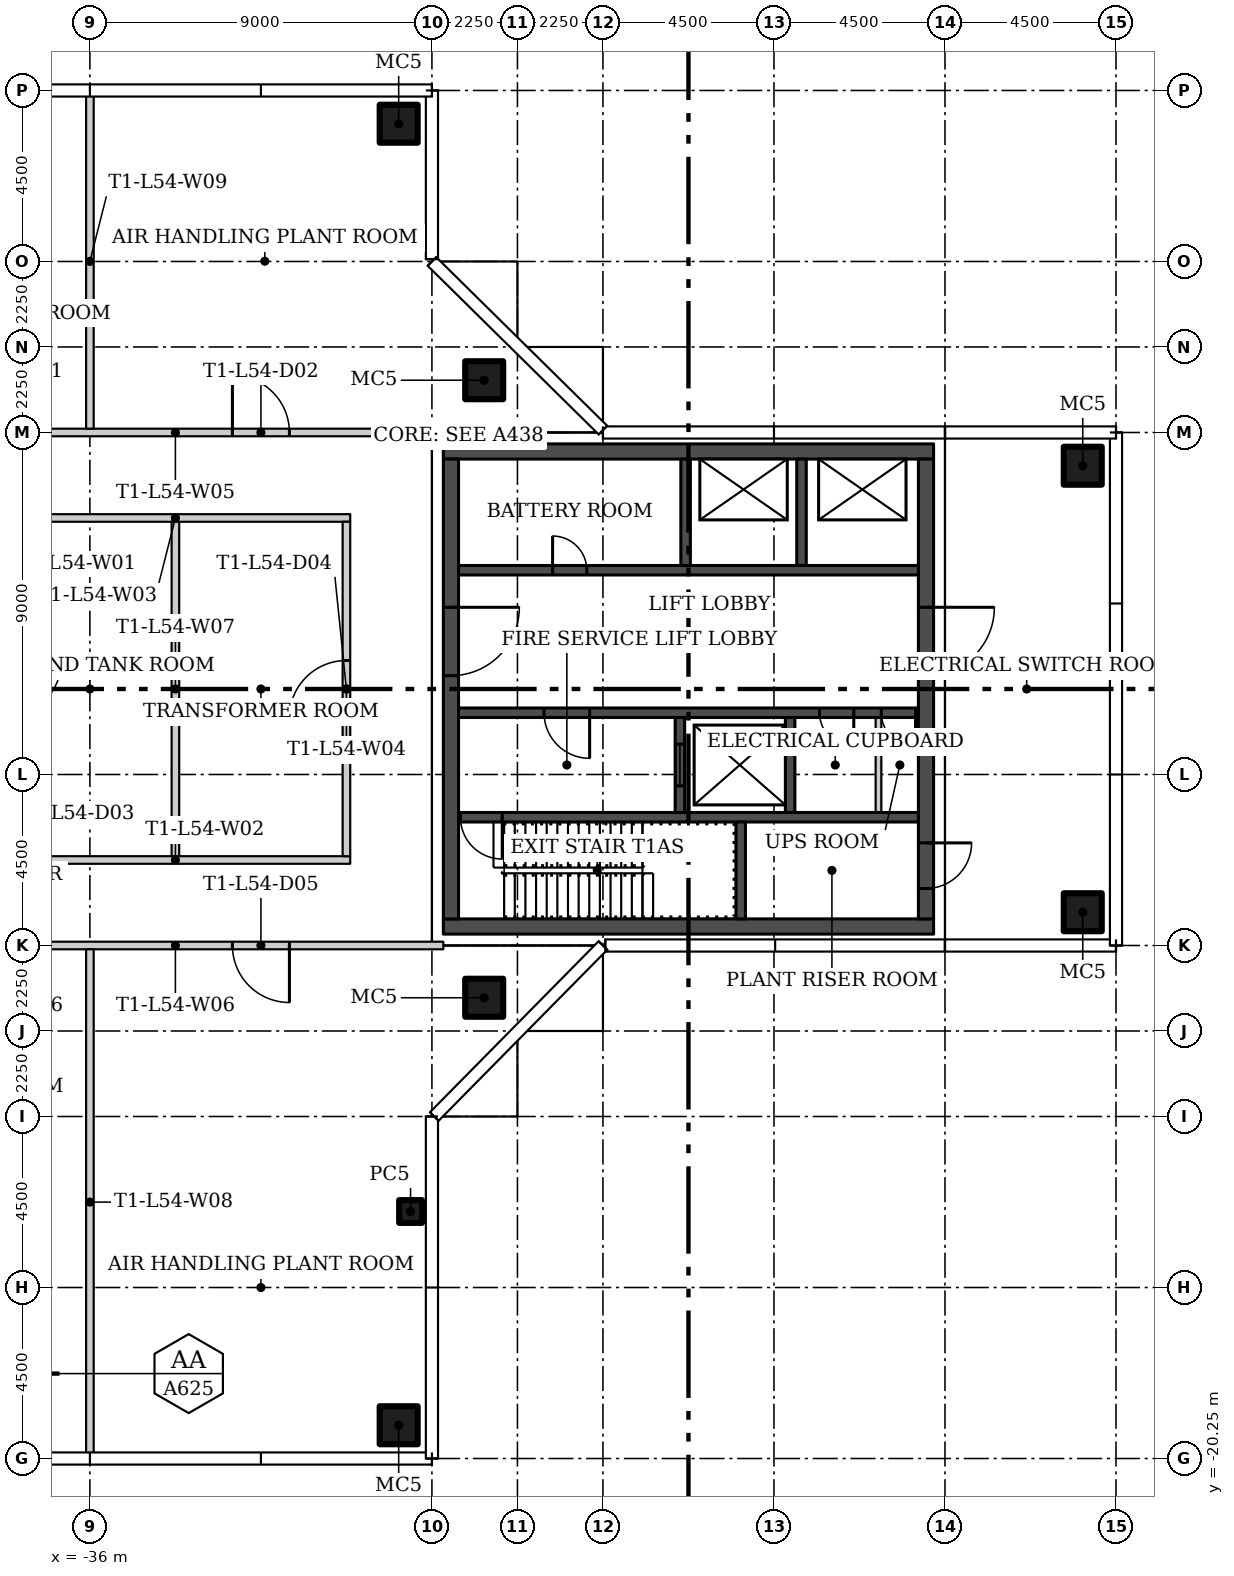
"""IFC4 building model, lengths in metres.
Left out: names, types, materials, properties, quantities, classifications, styles, units other than length and angle.
Written with IfcOpenShell. Run it as: python <this file> out.ifc"""

import sys

from ifc_helpers import new_model, si_unit, direction, frame, frame_2d, origin, origin_2d, place, context, subcontext, project, spatial, rectangle, hollow_rectangle, extrude, element, fill, save


model = new_model("IFC4")
c1 = context("Model", 3, precision=1e-05, world=origin(), true_north=direction((0.0, 1.0)))
c2 = subcontext(c1, "Body", "Model", "MODEL_VIEW")
j1 = project(units=[si_unit("LENGTHUNIT", "METRE"), si_unit("PLANEANGLEUNIT", "RADIAN")], contexts=[c1])
p1 = place(None, origin())
s1 = spatial("IfcSite", under=j1, at=p1, CompositionType="ELEMENT")
p2 = place(p1, origin())
s2 = spatial("IfcBuilding", under=s1, at=p2, CompositionType="ELEMENT")
p3 = place(p2, frame((0.0, 0.0, 225.6)))
s3 = spatial("IfcBuildingStorey", under=s2, at=p3, CompositionType="ELEMENT", Elevation=225.6)
for number, where in (
    (1, (-25.625, 8.125, 0.0)),
    (2, (-25.625, -8.125, 0.0)),
    (3, (-9.875, -5.875, 0.0)),
    (4, (-9.875, 5.875, 0.0)),
    (5, (-27.875, 14.875, 0.0)),
):
    element("IfcColumn", number, at=place(p3, frame(where)), inside=s3, PredefinedType="COLUMN", context=c2, shape_type="SweptSolid", body=[
        extrude(hollow_rectangle(XDim=1.0, YDim=1.0, WallThickness=0.04, at=origin_2d()), origin(), (0.0, 0.0, 1.0), 4.45),
    ])
p4 = place(p3, frame((-27.562, -13.75, 0.0)))
e6 = element("IfcColumn", 6, at=p4, inside=s3, PredefinedType="COLUMN", context=c2, shape_type="SweptSolid", body=[
    extrude(hollow_rectangle(XDim=0.6, YDim=0.6, WallThickness=0.02, at=origin_2d()), origin(), (0.0, 0.0, 1.0), 4.45),
])
p5 = place(p3, frame((-27.875, -19.375, 0.0)))
e7 = element("IfcColumn", 7, at=p5, inside=s3, PredefinedType="COLUMN", context=c2, shape_type="SweptSolid", body=[
    extrude(hollow_rectangle(XDim=1.0, YDim=1.0, WallThickness=0.04, at=origin_2d()), origin(), (0.0, 0.0, 1.0), 4.45),
])
p6 = place(p3, frame((-38.35, -4.5, 0.0)))
e8 = element("IfcWall", 8, at=p6, inside=s3, PredefinedType="PARTITIONING", context=c2, shape_type="SweptSolid", body=[
    extrude(rectangle(XDim=9.2, YDim=0.2, at=frame_2d((4.6, 0.0))), origin(), (0.0, 0.0, 1.0), 4.45),
])
p7 = place(p3, frame((-29.15, 4.5, 0.0), z_axis=(0.0, 0.0, 1.0), x_axis=(-1.0, 0.0, 0.0)))
e9 = element("IfcWall", 9, at=p7, inside=s3, PredefinedType="PARTITIONING", context=c2, shape_type="SweptSolid", body=[
    extrude(rectangle(XDim=9.2, YDim=0.2, at=frame_2d((4.6, 0.0))), origin(), (0.0, 0.0, 1.0), 4.45),
])
p8 = place(p3, frame((-29.25, -4.4, 0.0), z_axis=(0.0, 0.0, 1.0), x_axis=(0.0, 1.0, 0.0)))
e10 = element("IfcWall", 10, at=p8, inside=s3, PredefinedType="PARTITIONING", context=c2, shape_type="SweptSolid", body=[
    extrude(rectangle(XDim=8.8, YDim=0.2, at=frame_2d((4.4, 0.0))), origin(), (0.0, 0.0, 1.0), 4.45),
])
p9 = place(p8, frame((3.65, 0.0, 0.0)))
e11 = element("IfcOpeningElement", 11, at=p9, cuts=e10, PredefinedType="OPENING", context=c2, shape_type="SweptSolid", body=[
    extrude(rectangle(XDim=1.5, YDim=2.4, at=frame_2d((0.75, 1.2))), frame((0.0, 0.11, 0.0), z_axis=(0.0, -1.0, 0.0), x_axis=(1.0, 0.0, 0.0)), (0.0, 0.0, 1.0), 0.22),
])
p10 = place(p3, frame((-40.8, 6.75, 0.0)))
e12 = element("IfcWall", 12, at=p10, inside=s3, PredefinedType="PARTITIONING", context=c2, shape_type="SweptSolid", body=[
    extrude(rectangle(XDim=14.1, YDim=0.2, at=frame_2d((7.05, 0.0))), origin(), (0.0, 0.0, 1.0), 4.45),
])
p11 = place(p10, frame((1.8, 0.0, 0.0)))
e13 = element("IfcOpeningElement", 13, at=p11, cuts=e12, PredefinedType="OPENING", context=c2, shape_type="SweptSolid", body=[
    extrude(rectangle(XDim=1.5, YDim=2.4, at=frame_2d((0.75, 1.2))), frame((0.0, 0.11, 0.0), z_axis=(0.0, -1.0, 0.0), x_axis=(1.0, 0.0, 0.0)), (0.0, 0.0, 1.0), 0.22),
])
p12 = place(p10, frame((8.55, 0.0, 0.0)))
e14 = element("IfcOpeningElement", 14, at=p12, cuts=e12, PredefinedType="OPENING", context=c2, shape_type="SweptSolid", body=[
    extrude(rectangle(XDim=1.5, YDim=2.4, at=frame_2d((0.75, 1.2))), frame((0.0, 0.11, 0.0), z_axis=(0.0, -1.0, 0.0), x_axis=(1.0, 0.0, 0.0)), (0.0, 0.0, 1.0), 0.22),
])
p13 = place(p3, frame((-26.7, -6.75, 0.0), z_axis=(0.0, 0.0, 1.0), x_axis=(-1.0, 0.0, 0.0)))
e15 = element("IfcWall", 15, at=p13, inside=s3, PredefinedType="PARTITIONING", context=c2, shape_type="SweptSolid", body=[
    extrude(rectangle(XDim=14.1, YDim=0.2, at=frame_2d((7.05, 0.0))), origin(), (0.0, 0.0, 1.0), 4.45),
])
p14 = place(p13, frame((4.05, 0.0, 0.0)))
e16 = element("IfcOpeningElement", 16, at=p14, cuts=e15, PredefinedType="OPENING", context=c2, shape_type="SweptSolid", body=[
    extrude(rectangle(XDim=1.5, YDim=2.4, at=frame_2d((0.75, 1.2))), frame((0.0, 0.11, 0.0), z_axis=(0.0, -1.0, 0.0), x_axis=(1.0, 0.0, 0.0)), (0.0, 0.0, 1.0), 0.22),
])
p15 = place(p13, frame((10.8, 0.0, 0.0)))
e17 = element("IfcOpeningElement", 17, at=p15, cuts=e15, PredefinedType="OPENING", context=c2, shape_type="SweptSolid", body=[
    extrude(rectangle(XDim=1.5, YDim=2.4, at=frame_2d((0.75, 1.2))), frame((0.0, 0.11, 0.0), z_axis=(0.0, -1.0, 0.0), x_axis=(1.0, 0.0, 0.0)), (0.0, 0.0, 1.0), 0.22),
])
p16 = place(p3, frame((-33.75, -4.4, 0.0), z_axis=(0.0, 0.0, 1.0), x_axis=(0.0, 1.0, 0.0)))
e18 = element("IfcWall", 18, at=p16, inside=s3, PredefinedType="PARTITIONING", context=c2, shape_type="SweptSolid", body=[
    extrude(rectangle(XDim=8.8, YDim=0.2, at=frame_2d((4.4, 0.0))), origin(), (0.0, 0.0, 1.0), 4.45),
])
p17 = place(p3, frame((-36.0, -20.155, 0.0), z_axis=(0.0, 0.0, 1.0), x_axis=(0.0, 1.0, 0.0)))
e19 = element("IfcWall", 19, at=p17, inside=s3, PredefinedType="PARTITIONING", context=c2, shape_type="SweptSolid", body=[
    extrude(rectangle(XDim=13.305, YDim=0.2, at=frame_2d((6.652, 0.0))), origin(), (0.0, 0.0, 1.0), 4.45),
])
p18 = place(p3, frame((-36.0, 6.85, 0.0), z_axis=(0.0, 0.0, 1.0), x_axis=(0.0, 1.0, 0.0)))
e20 = element("IfcWall", 20, at=p18, inside=s3, PredefinedType="PARTITIONING", context=c2, shape_type="SweptSolid", body=[
    extrude(rectangle(XDim=8.805, YDim=0.2, at=frame_2d((4.402, 0.0))), origin(), (0.0, 0.0, 1.0), 4.45),
])
for number, where in (
    (21, (-26.7, -6.25, 0.0)),
    (22, (-26.7, 6.25, 0.0)),
):
    element("IfcWall", number, at=place(p3, frame(where)), inside=s3, PredefinedType="SHEAR", context=c2, shape_type="SweptSolid", body=[
        extrude(rectangle(XDim=12.9, YDim=0.4, at=frame_2d((6.45, 0.0))), origin(), (0.0, 0.0, 1.0), 4.45),
    ])
p19 = place(p3, frame((-26.5, 6.05, 0.0), z_axis=(0.0, 0.0, 1.0), x_axis=(0.0, -1.0, 0.0)))
e23 = element("IfcWall", 23, at=p19, inside=s3, PredefinedType="SHEAR", context=c2, shape_type="SweptSolid", body=[
    extrude(rectangle(XDim=12.1, YDim=0.4, at=frame_2d((6.05, 0.0))), origin(), (0.0, 0.0, 1.0), 4.45),
])
p20 = place(p19, frame((3.9, 0.0, 0.0)))
e24 = element("IfcOpeningElement", 24, at=p20, cuts=e23, PredefinedType="OPENING", context=c2, shape_type="SweptSolid", body=[
    extrude(rectangle(XDim=1.8, YDim=2.4, at=frame_2d((0.9, 1.2))), frame((0.0, 0.21, 0.0), z_axis=(0.0, -1.0, 0.0), x_axis=(1.0, 0.0, 0.0)), (0.0, 0.0, 1.0), 0.42),
])
p21 = place(p3, frame((-14.0, 6.05, 0.0), z_axis=(0.0, 0.0, 1.0), x_axis=(0.0, -1.0, 0.0)))
e25 = element("IfcWall", 25, at=p21, inside=s3, PredefinedType="SHEAR", context=c2, shape_type="SweptSolid", body=[
    extrude(rectangle(XDim=12.1, YDim=0.4, at=frame_2d((6.05, 0.0))), origin(), (0.0, 0.0, 1.0), 4.45),
])
p22 = place(p21, frame((10.1, 0.0, 0.0)))
e26 = element("IfcOpeningElement", 26, at=p22, cuts=e25, PredefinedType="OPENING", context=c2, shape_type="SweptSolid", body=[
    extrude(rectangle(XDim=1.2, YDim=2.1, at=frame_2d((0.6, 1.05))), frame((0.0, 0.21, 0.0), z_axis=(0.0, -1.0, 0.0), x_axis=(1.0, 0.0, 0.0)), (0.0, 0.0, 1.0), 0.42),
])
p23 = place(p21, frame((3.9, 0.0, 0.0)))
e27 = element("IfcOpeningElement", 27, at=p23, cuts=e25, PredefinedType="OPENING", context=c2, shape_type="SweptSolid", body=[
    extrude(rectangle(XDim=1.8, YDim=2.4, at=frame_2d((0.9, 1.2))), frame((0.0, 0.21, 0.0), z_axis=(0.0, -1.0, 0.0), x_axis=(1.0, 0.0, 0.0)), (0.0, 0.0, 1.0), 0.42),
])
p24 = place(p3, frame((-14.2, -3.375, 0.0), z_axis=(0.0, 0.0, 1.0), x_axis=(-1.0, 0.0, 0.0)))
e28 = element("IfcWall", 28, at=p24, inside=s3, PredefinedType="SHEAR", context=c2, shape_type="SweptSolid", body=[
    extrude(rectangle(XDim=12.1, YDim=0.25, at=frame_2d((6.05, 0.0))), origin(), (0.0, 0.0, 1.0), 4.45),
])
p25 = place(p24, frame((10.95, 0.0, 0.0)))
e29 = element("IfcOpeningElement", 29, at=p25, cuts=e28, PredefinedType="OPENING", context=c2, shape_type="SweptSolid", body=[
    extrude(rectangle(XDim=1.1, YDim=2.1, at=frame_2d((0.55, 1.05))), frame((0.0, 0.135, 0.0), z_axis=(0.0, -1.0, 0.0), x_axis=(1.0, 0.0, 0.0)), (0.0, 0.0, 1.0), 0.27),
])
p26 = place(p3, frame((-18.875, -6.05, 0.0), z_axis=(0.0, 0.0, 1.0), x_axis=(0.0, 1.0, 0.0)))
e30 = element("IfcWall", 30, at=p26, inside=s3, PredefinedType="SHEAR", context=c2, shape_type="SweptSolid", body=[
    extrude(rectangle(XDim=2.55, YDim=0.25, at=frame_2d((1.275, 0.0))), origin(), (0.0, 0.0, 1.0), 4.45),
])
p27 = place(p3, frame((-14.2, -0.625, 0.0), z_axis=(0.0, 0.0, 1.0), x_axis=(-1.0, 0.0, 0.0)))
e31 = element("IfcWall", 31, at=p27, inside=s3, PredefinedType="SHEAR", context=c2, shape_type="SweptSolid", body=[
    extrude(rectangle(XDim=12.1, YDim=0.25, at=frame_2d((6.05, 0.0))), origin(), (0.0, 0.0, 1.0), 4.45),
])
p28 = place(p27, frame((8.65, 0.0, 0.0)))
e32 = element("IfcOpeningElement", 32, at=p28, cuts=e31, PredefinedType="OPENING", context=c2, shape_type="SweptSolid", body=[
    extrude(rectangle(XDim=1.2, YDim=2.1, at=frame_2d((0.6, 1.05))), frame((0.0, 0.135, 0.0), z_axis=(0.0, -1.0, 0.0), x_axis=(1.0, 0.0, 0.0)), (0.0, 0.0, 1.0), 0.27),
])
p29 = place(p27, frame((1.7, 0.0, 0.0)))
e33 = element("IfcOpeningElement", 33, at=p29, cuts=e31, PredefinedType="OPENING", context=c2, shape_type="SweptSolid", body=[
    extrude(rectangle(XDim=0.9, YDim=2.1, at=frame_2d((0.45, 1.05))), frame((0.0, 0.135, 0.0), z_axis=(0.0, -1.0, 0.0), x_axis=(1.0, 0.0, 0.0)), (0.0, 0.0, 1.0), 0.27),
])
p30 = place(p27, frame((0.075, 0.0, 0.0)))
e34 = element("IfcOpeningElement", 34, at=p30, cuts=e31, PredefinedType="OPENING", context=c2, shape_type="SweptSolid", body=[
    extrude(rectangle(XDim=0.9, YDim=2.1, at=frame_2d((0.45, 1.05))), frame((0.0, 0.135, 0.0), z_axis=(0.0, -1.0, 0.0), x_axis=(1.0, 0.0, 0.0)), (0.0, 0.0, 1.0), 0.27),
])
p31 = place(p3, frame((-20.475, -3.25, 0.0), z_axis=(0.0, 0.0, 1.0), x_axis=(0.0, 1.0, 0.0)))
e35 = element("IfcWall", 35, at=p31, inside=s3, PredefinedType="SHEAR", context=c2, shape_type="SweptSolid", body=[
    extrude(rectangle(XDim=2.5, YDim=0.25, at=frame_2d((1.25, 0.0))), origin(), (0.0, 0.0, 1.0), 4.45),
])
p32 = place(p31, frame((0.7, 0.0, 0.0)))
e36 = element("IfcOpeningElement", 36, at=p32, cuts=e35, PredefinedType="OPENING", context=c2, shape_type="SweptSolid", body=[
    extrude(rectangle(XDim=1.1, YDim=2.1, at=frame_2d((0.55, 1.05))), frame((0.0, 0.135, 0.0), z_axis=(0.0, -1.0, 0.0), x_axis=(1.0, 0.0, 0.0)), (0.0, 0.0, 1.0), 0.27),
])
p33 = place(p3, frame((-17.575, -3.25, 0.0), z_axis=(0.0, 0.0, 1.0), x_axis=(0.0, 1.0, 0.0)))
e37 = element("IfcWall", 37, at=p33, inside=s3, PredefinedType="SHEAR", context=c2, shape_type="SweptSolid", body=[
    extrude(rectangle(XDim=2.5, YDim=0.25, at=frame_2d((1.25, 0.0))), origin(), (0.0, 0.0, 1.0), 4.45),
])
p34 = place(p3, frame((-15.25, -3.25, 0.0), z_axis=(0.0, 0.0, 1.0), x_axis=(0.0, 1.0, 0.0)))
e38 = element("IfcWall", 38, at=p34, inside=s3, PredefinedType="PARTITIONING", context=c2, shape_type="SweptSolid", body=[
    extrude(rectangle(XDim=2.5, YDim=0.15, at=frame_2d((1.25, 0.0))), origin(), (0.0, 0.0, 1.0), 4.45),
])
p35 = place(p3, frame((-26.3, 3.125, 0.0)))
e39 = element("IfcWall", 39, at=p35, inside=s3, PredefinedType="SHEAR", context=c2, shape_type="SweptSolid", body=[
    extrude(rectangle(XDim=12.1, YDim=0.25, at=frame_2d((6.05, 0.0))), origin(), (0.0, 0.0, 1.0), 4.45),
])
p36 = place(p35, frame((2.475, 0.0, 0.0)))
e40 = element("IfcOpeningElement", 40, at=p36, cuts=e39, PredefinedType="OPENING", context=c2, shape_type="SweptSolid", body=[
    extrude(rectangle(XDim=0.9, YDim=2.1, at=frame_2d((0.45, 1.05))), frame((0.0, 0.135, 0.0), z_axis=(0.0, -1.0, 0.0), x_axis=(1.0, 0.0, 0.0)), (0.0, 0.0, 1.0), 0.27),
])
for number, where, z_axis, x_axis in (
    (41, (-20.325, 3.25, 0.0), (0.0, 0.0, 1.0), (0.0, 1.0, 0.0)),
    (42, (-17.275, 3.25, 0.0), (0.0, 0.0, 1.0), (0.0, 1.0, 0.0)),
):
    element("IfcWall", number, at=place(p3, frame(where, z_axis=z_axis, x_axis=x_axis)), inside=s3, PredefinedType="SHEAR", context=c2, shape_type="SweptSolid", body=[
        extrude(rectangle(XDim=2.8, YDim=0.25, at=frame_2d((1.4, 0.0))), origin(), (0.0, 0.0, 1.0), 4.45),
    ])
p37 = place(p12, origin())
e43 = element("IfcDoor", 43, at=p37, inside=s3, OperationType="DOUBLE_DOOR_SINGLE_SWING", PredefinedType="DOOR", context=c2, shape_type="SweptSolid", body=[
    extrude(rectangle(XDim=1.5, YDim=2.4, at=frame_2d((0.75, 1.2))), frame((0.0, 0.025, 0.0), z_axis=(0.0, -1.0, 0.0), x_axis=(1.0, 0.0, 0.0)), (0.0, 0.0, 1.0), 0.05),
])
fill(e14, e43)
p38 = place(p9, origin())
e44 = element("IfcDoor", 44, at=p38, inside=s3, OperationType="DOUBLE_DOOR_SINGLE_SWING", PredefinedType="DOOR", context=c2, shape_type="SweptSolid", body=[
    extrude(rectangle(XDim=1.5, YDim=2.4, at=frame_2d((0.75, 1.2))), frame((0.0, 0.025, 0.0), z_axis=(0.0, -1.0, 0.0), x_axis=(1.0, 0.0, 0.0)), (0.0, 0.0, 1.0), 0.05),
])
fill(e11, e44)
p39 = place(p14, origin())
e45 = element("IfcDoor", 45, at=p39, inside=s3, OperationType="DOUBLE_DOOR_SINGLE_SWING", PredefinedType="DOOR", context=c2, shape_type="SweptSolid", body=[
    extrude(rectangle(XDim=1.5, YDim=2.4, at=frame_2d((0.75, 1.2))), frame((0.0, 0.025, 0.0), z_axis=(0.0, -1.0, 0.0), x_axis=(1.0, 0.0, 0.0)), (0.0, 0.0, 1.0), 0.05),
])
fill(e16, e45)
p40 = place(p20, origin())
e46 = element("IfcDoor", 46, at=p40, inside=s3, OperationType="DOUBLE_DOOR_SINGLE_SWING", PredefinedType="DOOR", context=c2, shape_type="SweptSolid", body=[
    extrude(rectangle(XDim=1.8, YDim=2.4, at=frame_2d((0.9, 1.2))), frame((0.0, 0.025, 0.0), z_axis=(0.0, -1.0, 0.0), x_axis=(1.0, 0.0, 0.0)), (0.0, 0.0, 1.0), 0.05),
])
fill(e24, e46)
p41 = place(p22, origin())
e47 = element("IfcDoor", 47, at=p41, inside=s3, OperationType="SINGLE_SWING_RIGHT", PredefinedType="DOOR", context=c2, shape_type="SweptSolid", body=[
    extrude(rectangle(XDim=1.2, YDim=2.1, at=frame_2d((0.6, 1.05))), frame((0.0, 0.025, 0.0), z_axis=(0.0, -1.0, 0.0), x_axis=(1.0, 0.0, 0.0)), (0.0, 0.0, 1.0), 0.05),
])
fill(e26, e47)
p42 = place(p23, origin())
e48 = element("IfcDoor", 48, at=p42, inside=s3, OperationType="DOUBLE_DOOR_SINGLE_SWING", PredefinedType="DOOR", context=c2, shape_type="SweptSolid", body=[
    extrude(rectangle(XDim=1.8, YDim=2.4, at=frame_2d((0.9, 1.2))), frame((0.0, 0.025, 0.0), z_axis=(0.0, -1.0, 0.0), x_axis=(1.0, 0.0, 0.0)), (0.0, 0.0, 1.0), 0.05),
])
fill(e27, e48)
p43 = place(p25, origin())
e49 = element("IfcDoor", 49, at=p43, inside=s3, OperationType="SINGLE_SWING_RIGHT", PredefinedType="DOOR", context=c2, shape_type="SweptSolid", body=[
    extrude(rectangle(XDim=1.1, YDim=2.1, at=frame_2d((0.55, 1.05))), frame((0.0, 0.025, 0.0), z_axis=(0.0, -1.0, 0.0), x_axis=(1.0, 0.0, 0.0)), (0.0, 0.0, 1.0), 0.05),
])
fill(e29, e49)
p44 = place(p28, origin())
e50 = element("IfcDoor", 50, at=p44, inside=s3, OperationType="SINGLE_SWING_RIGHT", PredefinedType="DOOR", context=c2, shape_type="SweptSolid", body=[
    extrude(rectangle(XDim=1.2, YDim=2.1, at=frame_2d((0.6, 1.05))), frame((0.0, 0.025, 0.0), z_axis=(0.0, -1.0, 0.0), x_axis=(1.0, 0.0, 0.0)), (0.0, 0.0, 1.0), 0.05),
])
fill(e32, e50)
p45 = place(p29, origin())
e51 = element("IfcDoor", 51, at=p45, inside=s3, OperationType="SINGLE_SWING_LEFT", PredefinedType="DOOR", context=c2, shape_type="SweptSolid", body=[
    extrude(rectangle(XDim=0.9, YDim=2.1, at=frame_2d((0.45, 1.05))), frame((0.0, 0.025, 0.0), z_axis=(0.0, -1.0, 0.0), x_axis=(1.0, 0.0, 0.0)), (0.0, 0.0, 1.0), 0.05),
])
fill(e33, e51)
p46 = place(p30, origin())
e52 = element("IfcDoor", 52, at=p46, inside=s3, OperationType="SINGLE_SWING_LEFT", PredefinedType="DOOR", context=c2, shape_type="SweptSolid", body=[
    extrude(rectangle(XDim=0.9, YDim=2.1, at=frame_2d((0.45, 1.05))), frame((0.0, 0.025, 0.0), z_axis=(0.0, -1.0, 0.0), x_axis=(1.0, 0.0, 0.0)), (0.0, 0.0, 1.0), 0.05),
])
fill(e34, e52)
p47 = place(p32, origin())
e53 = element("IfcDoor", 53, at=p47, inside=s3, OperationType="SLIDING_TO_LEFT", PredefinedType="DOOR", context=c2, shape_type="SweptSolid", body=[
    extrude(rectangle(XDim=1.1, YDim=2.1, at=frame_2d((0.55, 1.05))), frame((0.0, 0.025, 0.0), z_axis=(0.0, -1.0, 0.0), x_axis=(1.0, 0.0, 0.0)), (0.0, 0.0, 1.0), 0.05),
])
fill(e36, e53)
p48 = place(p36, origin())
e54 = element("IfcDoor", 54, at=p48, inside=s3, OperationType="SINGLE_SWING_LEFT", PredefinedType="DOOR", context=c2, shape_type="SweptSolid", body=[
    extrude(rectangle(XDim=0.9, YDim=2.1, at=frame_2d((0.45, 1.05))), frame((0.0, 0.025, 0.0), z_axis=(0.0, -1.0, 0.0), x_axis=(1.0, 0.0, 0.0)), (0.0, 0.0, 1.0), 0.05),
])
fill(e40, e54)
save(model, sys.argv[1])
